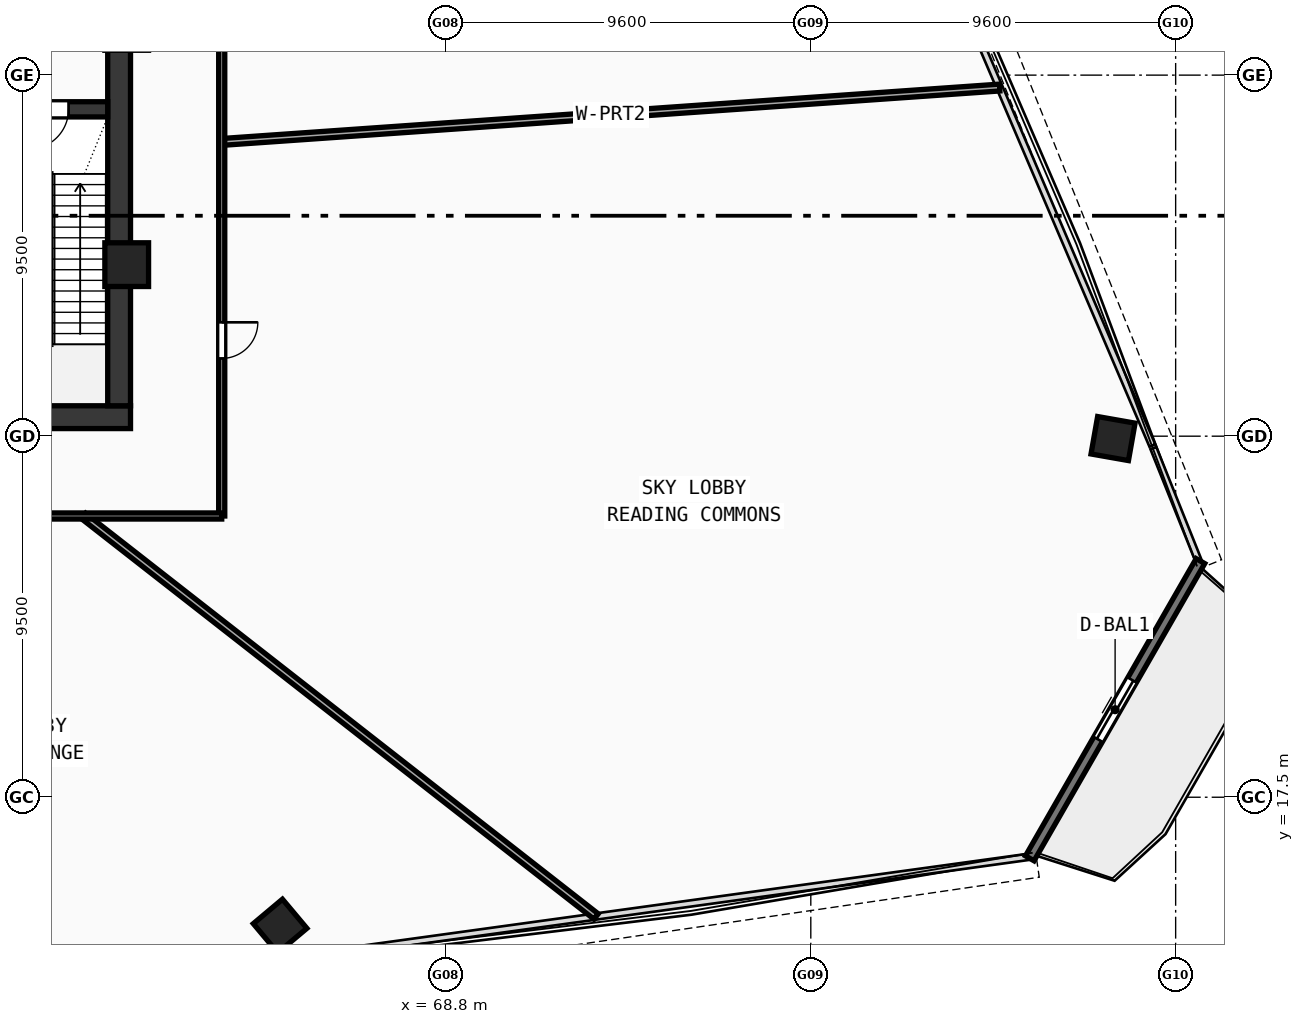
"""IFC4 building model, lengths in metres.
Left out: names, types, materials, properties, quantities, classifications, styles, units other than length and angle.
Written with IfcOpenShell. Run it as: python <this file> out.ifc"""

import sys

from ifc_helpers import new_model, si_unit, direction, frame, frame_2d, origin, origin_with_axes, origin_2d, place, context, subcontext, project, spatial, rectangle, hollow_rectangle, extrude, source, transform, mapped, element, fill, save


model = new_model("IFC4")
c1 = context("Model", 3, precision=1e-05, world=origin(), true_north=direction((0.0, 1.0)))
c2 = subcontext(c1, "Body", "Model", "MODEL_VIEW")
j1 = project(units=[si_unit("LENGTHUNIT", "METRE"), si_unit("PLANEANGLEUNIT", "RADIAN")], contexts=[c1])
p1 = place(None, origin())
s1 = spatial("IfcSite", under=j1, at=p1, CompositionType="ELEMENT")
p2 = place(p1, origin())
s2 = spatial("IfcBuilding", under=s1, at=p2, CompositionType="ELEMENT")
p3 = place(p2, frame((0.0, 0.0, 119.18)))
s3 = spatial("IfcBuildingStorey", under=s2, at=p3, CompositionType="ELEMENT", Elevation=119.18)
p4 = place(p3, frame((35.5, 27.5, 0.0), z_axis=(0.0, 0.0, 1.0), x_axis=(1.0, 0.0, 0.0)))
e1 = element("IfcWall", 1, at=p4, inside=s3, PredefinedType="SHEAR", context=c2, shape_type="SweptSolid", body=[
    extrude(rectangle(XDim=25.0, YDim=0.6, at=frame_2d((12.5, 0.0))), origin(), (0.0, 0.0, 1.0), 5.57),
])
p5 = place(p3, frame((60.2, 27.8, 0.0), z_axis=(0.0, 0.0, 1.0), x_axis=(0.0, 1.0, 0.0)))
e2 = element("IfcWall", 2, at=p5, inside=s3, PredefinedType="SHEAR", context=c2, shape_type="SweptSolid", body=[
    extrude(rectangle(XDim=12.1, YDim=0.6, at=frame_2d((6.05, 0.0))), origin(), (0.0, 0.0, 1.0), 5.57),
])
p6 = place(p3, frame((56.8, 35.6, 0.0), z_axis=(0.0, 0.0, 1.0), x_axis=(1.0, 0.0, 0.0)))
e3 = element("IfcWall", 3, at=p6, inside=s3, PredefinedType="SHEAR", context=c2, shape_type="SweptSolid", body=[
    extrude(rectangle(XDim=3.1, YDim=0.4, at=frame_2d((1.55, 0.0))), origin(), (0.0, 0.0, 1.0), 5.57),
])
p7 = place(p6, frame((1.02, 0.0, 0.0)))
e4 = element("IfcOpeningElement", 4, at=p7, cuts=e3, PredefinedType="OPENING", context=c2, shape_type="SweptSolid", body=[
    extrude(rectangle(XDim=1.05, YDim=2.1, at=frame_2d((0.525, 1.05))), frame((0.0, 0.21, 0.0), z_axis=(0.0, -1.0, 0.0), x_axis=(1.0, 0.0, 0.0)), (0.0, 0.0, 1.0), 0.42),
])
m1 = source(origin(), c2, "Body", "SweptSolid", [
    extrude(hollow_rectangle(XDim=1.15, YDim=1.15, WallThickness=0.048, at=origin_2d()), origin(), (0.0, 0.0, 1.0), 5.85),
])
p8 = place(p3, frame((60.4, 31.513, -0.28), z_axis=(0.0, 0.0, 1.0), x_axis=(1.0, 0.0, 0.0)))
e5 = element("IfcColumn", 5, at=p8, inside=s3, PredefinedType="COLUMN", context=c2, shape_type="MappedRepresentation", body=[
    mapped(m1, transform((0.0, 0.0, 0.0), scale=1.0)),
])
m2 = source(origin(), c2, "Body", "SweptSolid", [
    extrude(hollow_rectangle(XDim=1.0, YDim=1.0, WallThickness=0.042, at=origin_2d()), origin(), (0.0, 0.0, 1.0), 5.85),
])
for number, where, z_axis, x_axis in (
    (6, (64.436, 14.112, -0.28), (0.0, 0.0, 1.0), (0.766, 0.643, 0.0)),
    (7, (86.353, 26.938, -0.28), (0.0, 0.0, 1.0), (0.174, 0.985, 0.0)),
):
    element("IfcColumn", number, at=place(p3, frame(where, z_axis=z_axis, x_axis=x_axis)), inside=s3, PredefinedType="COLUMN", context=c2, shape_type="MappedRepresentation", body=[
        mapped(m2, transform((0.0, 0.0, 0.0), scale=1.0)),
    ])
p9 = place(p3, frame((84.162, 15.892, 0.0), z_axis=(0.0, 0.0, 1.0), x_axis=(0.497936512869, 0.867213485338, 0.0)))
e8 = element("IfcWall", 8, at=p9, inside=s3, PredefinedType="STANDARD", context=c2, shape_type="SweptSolid", body=[
    extrude(rectangle(XDim=9.019, YDim=0.26, at=frame_2d((4.51, 0.0))), origin(), (0.0, 0.0, 1.0), 5.57),
])
p10 = place(p9, frame((3.61, 0.0, 0.0)))
e9 = element("IfcOpeningElement", 9, at=p10, cuts=e8, PredefinedType="OPENING", context=c2, shape_type="SweptSolid", body=[
    extrude(rectangle(XDim=1.8, YDim=2.15, at=frame_2d((0.9, 1.075))), frame((0.0, 0.14, 0.0), z_axis=(0.0, -1.0, 0.0), x_axis=(1.0, 0.0, 0.0)), (0.0, 0.0, 1.0), 0.28),
])
p11 = place(p3, frame((62.9, 34.742, 0.0), z_axis=(0.0, 0.0, 1.0), x_axis=(0.99756459993, 0.069748612653, 0.0)))
e10 = element("IfcWall", 10, at=p11, inside=s3, PredefinedType="PARTITIONING", context=c2, shape_type="SweptSolid", body=[
    extrude(rectangle(XDim=20.519, YDim=0.18, at=frame_2d((10.259, 0.0))), origin(), (0.0, 0.0, 1.0), 4.87),
])
p12 = place(p3, frame((59.263, 24.9, 0.0), z_axis=(0.0, 0.0, 1.0), x_axis=(0.788013994076, -0.615657327692, 0.0)))
e11 = element("IfcWall", 11, at=p12, inside=s3, PredefinedType="PARTITIONING", context=c2, shape_type="SweptSolid", body=[
    extrude(rectangle(XDim=17.117, YDim=0.18, at=frame_2d((8.558, 0.0))), origin(), (0.0, 0.0, 1.0), 4.87),
])
p13 = place(p3, frame((62.9, 42.25, 0.0), z_axis=(0.0, 0.0, 1.0), x_axis=(0.0, -1.0, 0.0)))
e12 = element("IfcWall", 12, at=p13, inside=s3, PredefinedType="PARTITIONING", context=c2, shape_type="SweptSolid", body=[
    extrude(rectangle(XDim=17.35, YDim=0.16, at=frame_2d((8.675, 0.0))), origin(), (0.0, 0.0, 1.0), 2.22),
])
p14 = place(p13, frame((12.254, 0.0, 0.0)))
e13 = element("IfcOpeningElement", 13, at=p14, cuts=e12, PredefinedType="OPENING", context=c2, shape_type="SweptSolid", body=[
    extrude(rectangle(XDim=0.95, YDim=2.1, at=frame_2d((0.475, 1.05))), frame((0.0, 0.09, 0.0), z_axis=(0.0, -1.0, 0.0), x_axis=(1.0, 0.0, 0.0)), (0.0, 0.0, 1.0), 0.18),
])
p15 = place(p3, frame((62.9, 24.9, 0.0), z_axis=(0.0, 0.0, 1.0), x_axis=(-1.0, 0.0, 0.0)))
e14 = element("IfcWall", 14, at=p15, inside=s3, PredefinedType="PARTITIONING", context=c2, shape_type="SweptSolid", body=[
    extrude(rectangle(XDim=29.8, YDim=0.16, at=frame_2d((14.9, 0.0))), origin(), (0.0, 0.0, 1.0), 2.22),
])
p16 = place(p15, frame((24.514, 0.0, 0.0)))
e15 = element("IfcOpeningElement", 15, at=p16, cuts=e14, PredefinedType="OPENING", context=c2, shape_type="SweptSolid", body=[
    extrude(rectangle(XDim=0.95, YDim=2.1, at=frame_2d((0.475, 1.05))), frame((0.0, 0.09, 0.0), z_axis=(0.0, -1.0, 0.0), x_axis=(1.0, 0.0, 0.0)), (0.0, 0.0, 1.0), 0.18),
])
p17 = place(p15, frame((16.764, 0.0, 0.0)))
e16 = element("IfcOpeningElement", 16, at=p17, cuts=e14, PredefinedType="OPENING", context=c2, shape_type="SweptSolid", body=[
    extrude(rectangle(XDim=0.95, YDim=2.1, at=frame_2d((0.475, 1.05))), frame((0.0, 0.09, 0.0), z_axis=(0.0, -1.0, 0.0), x_axis=(1.0, 0.0, 0.0)), (0.0, 0.0, 1.0), 0.18),
])
p18 = place(p15, frame((8.793, 0.0, 0.0)))
e17 = element("IfcOpeningElement", 17, at=p18, cuts=e14, PredefinedType="OPENING", context=c2, shape_type="SweptSolid", body=[
    extrude(rectangle(XDim=0.95, YDim=2.1, at=frame_2d((0.475, 1.05))), frame((0.0, 0.09, 0.0), z_axis=(0.0, -1.0, 0.0), x_axis=(1.0, 0.0, 0.0)), (0.0, 0.0, 1.0), 0.18),
])
m3 = source(origin(), c2, "Body", "SweptSolid", [
    extrude(rectangle(XDim=1.8, YDim=2.15, at=frame_2d((0.9, 1.075))), frame((0.0, 0.025, 0.0), z_axis=(0.0, -1.0, 0.0), x_axis=(1.0, 0.0, 0.0)), (0.0, 0.0, 1.0), 0.05),
])
p19 = place(p10, origin_with_axes())
e18 = element("IfcDoor", 18, at=p19, inside=s3, OperationType="DOUBLE_DOOR_SLIDING", PredefinedType="DOOR", context=c2, shape_type="MappedRepresentation", body=[
    mapped(m3, transform((0.0, 0.0, 0.0), scale=1.0)),
])
fill(e9, e18)
m4 = source(origin(), c2, "Body", "SweptSolid", [
    extrude(rectangle(XDim=1.05, YDim=2.1, at=frame_2d((0.525, 1.05))), frame((0.0, 0.025, 0.0), z_axis=(0.0, -1.0, 0.0), x_axis=(1.0, 0.0, 0.0)), (0.0, 0.0, 1.0), 0.05),
])
p20 = place(p7, frame((1.05, 0.0, 0.0), z_axis=(0.0, 0.0, 1.0), x_axis=(-1.0, 0.0, 0.0)))
e19 = element("IfcDoor", 19, at=p20, inside=s3, OperationType="SINGLE_SWING_RIGHT", PredefinedType="DOOR", context=c2, shape_type="MappedRepresentation", body=[
    mapped(m4, transform((0.0, 0.0, 0.0), scale=1.0)),
])
fill(e4, e19)
m5 = source(origin(), c2, "Body", "SweptSolid", [
    extrude(rectangle(XDim=0.95, YDim=2.1, at=frame_2d((0.475, 1.05))), frame((0.0, 0.025, 0.0), z_axis=(0.0, -1.0, 0.0), x_axis=(1.0, 0.0, 0.0)), (0.0, 0.0, 1.0), 0.05),
])
p21 = place(p14, origin_with_axes())
e20 = element("IfcDoor", 20, at=p21, inside=s3, OperationType="SINGLE_SWING_LEFT", PredefinedType="DOOR", context=c2, shape_type="MappedRepresentation", body=[
    mapped(m5, transform((0.0, 0.0, 0.0), scale=1.0)),
])
fill(e13, e20)
save(model, sys.argv[1])
